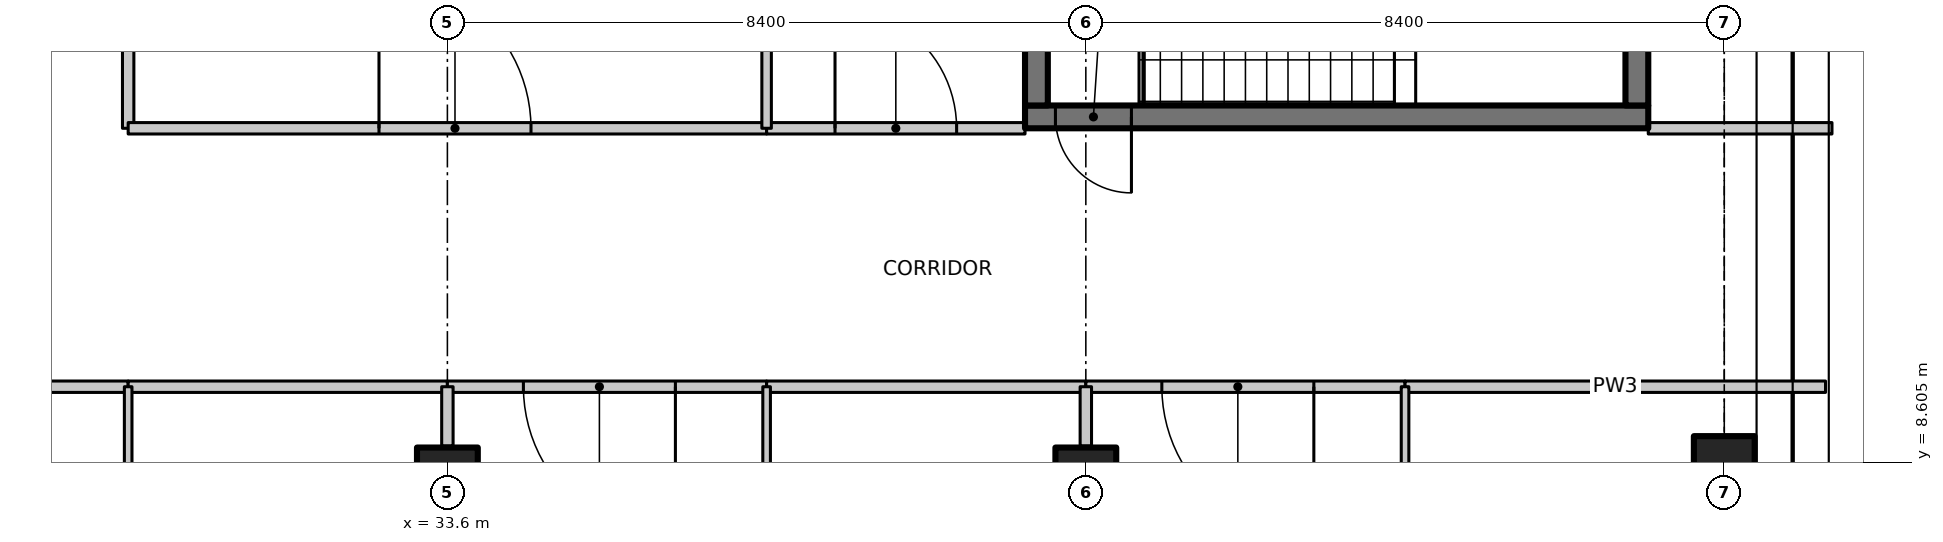
"""IFC4 building model, lengths in metres.
Left out: names, types, materials, properties, quantities, classifications, styles, units other than length and angle.
Written with IfcOpenShell. Run it as: python <this file> out.ifc"""

import sys

from ifc_helpers import new_model, si_unit, direction, frame, frame_2d, origin, origin_2d, place, context, subcontext, project, spatial, polyline, rectangle, outline, extrude, element, fill, save


model = new_model("IFC4")
c1 = context("Model", 3, precision=1e-05, world=origin(), true_north=direction((0.0, 1.0)))
c2 = subcontext(c1, "Body", "Model", "MODEL_VIEW")
j1 = project(units=[si_unit("LENGTHUNIT", "METRE"), si_unit("PLANEANGLEUNIT", "RADIAN")], contexts=[c1])
p1 = place(None, origin())
s1 = spatial("IfcSite", under=j1, at=p1, CompositionType="ELEMENT")
p2 = place(p1, origin())
s2 = spatial("IfcBuilding", under=s1, at=p2, CompositionType="ELEMENT")
p3 = place(p2, frame((0.0, 0.0, 251.7)))
s3 = spatial("IfcBuildingStorey", under=s2, at=p3, CompositionType="ELEMENT", Elevation=251.7)
for number, where, z_axis, x_axis in (
    (1, (33.6, 8.4, 0.0), (0.0, 0.0, 1.0), (1.0, 0.0, 0.0)),
    (2, (42.0, 8.4, 0.0), (0.0, 0.0, 1.0), (1.0, 0.0, 0.0)),
):
    element("IfcColumn", number, at=place(p3, frame(where, z_axis=z_axis, x_axis=x_axis)), inside=s3, PredefinedType="COLUMN", context=c2, shape_type="SweptSolid", body=[
        extrude(rectangle(XDim=0.8, YDim=0.8, at=origin_2d()), origin(), (0.0, 0.0, 1.0), 4.05),
    ])
p4 = place(p3, frame((50.4, 8.4, 0.0), z_axis=(0.0, 0.0, 1.0), x_axis=(1.0, 0.0, 0.0)))
e3 = element("IfcColumn", 3, at=p4, inside=s3, PredefinedType="COLUMN", context=c2, shape_type="SweptSolid", body=[
    extrude(rectangle(XDim=0.8, YDim=1.1, at=origin_2d()), origin(), (0.0, 0.0, 1.0), 4.05),
])
p5 = place(p3, frame((49.4, 13.15, 0.0), z_axis=(0.0, 0.0, 1.0), x_axis=(-1.0, 0.0, 0.0)))
e4 = element("IfcWall", 4, at=p5, inside=s3, PredefinedType="SHEAR", context=c2, shape_type="SweptSolid", body=[
    extrude(rectangle(XDim=8.2, YDim=0.3, at=frame_2d((4.1, 0.0))), origin(), (0.0, 0.0, 1.0), 4.05),
])
p6 = place(p5, frame((6.8, 0.0, 0.0)))
e5 = element("IfcOpeningElement", 5, at=p6, cuts=e4, PredefinedType="OPENING", context=c2, shape_type="SweptSolid", body=[
    extrude(rectangle(XDim=1.0, YDim=2.1, at=frame_2d((0.5, 1.05))), frame((0.0, 0.16, 0.0), z_axis=(0.0, -1.0, 0.0), x_axis=(1.0, 0.0, 0.0)), (0.0, 0.0, 1.0), 0.32),
])
for number, where, z_axis, x_axis in (
    (6, (41.35, 13.3, 0.0), (0.0, 0.0, 1.0), (0.0, 1.0, 0.0)),
    (7, (49.25, 13.3, 0.0), (0.0, 0.0, 1.0), (0.0, 1.0, 0.0)),
):
    element("IfcWall", number, at=place(p3, frame(where, z_axis=z_axis, x_axis=x_axis)), inside=s3, PredefinedType="SHEAR", context=c2, shape_type="SweptSolid", body=[
        extrude(rectangle(XDim=2.55, YDim=0.3, at=frame_2d((1.275, 0.0))), origin(), (0.0, 0.0, 1.0), 4.05),
    ])
p7 = place(p3, frame((29.4, 9.6, 0.0), z_axis=(0.0, 0.0, 1.0), x_axis=(-1.0, 0.0, 0.0)))
e8 = element("IfcWall", 8, at=p7, inside=s3, PredefinedType="PARTITIONING", context=c2, shape_type="SweptSolid", body=[
    extrude(rectangle(XDim=4.2, YDim=0.15, at=frame_2d((2.1, 0.0))), origin(), (0.0, 0.0, 1.0), 4.03),
])
p8 = place(p7, frame((1.2, 0.0, 0.0)))
e9 = element("IfcOpeningElement", 9, at=p8, cuts=e8, PredefinedType="OPENING", context=c2, shape_type="SweptSolid", body=[
    extrude(rectangle(XDim=1.6, YDim=2.1, at=frame_2d((0.8, 1.05))), frame((0.0, 0.085, 0.0), z_axis=(0.0, -1.0, 0.0), x_axis=(1.0, 0.0, 0.0)), (0.0, 0.0, 1.0), 0.17),
])
p9 = place(p3, frame((29.4, 21.2, 0.0), z_axis=(0.0, 0.0, 1.0), x_axis=(0.0, -1.0, 0.0)))
e10 = element("IfcWall", 10, at=p9, inside=s3, PredefinedType="PARTITIONING", context=c2, shape_type="SweptSolid", body=[
    extrude(rectangle(XDim=8.2, YDim=0.15, at=frame_2d((4.1, 0.0))), origin(), (0.0, 0.0, 1.0), 4.03),
])
p10 = place(p3, frame((33.6, 9.6, 0.0), z_axis=(0.0, 0.0, 1.0), x_axis=(-1.0, 0.0, 0.0)))
e11 = element("IfcWall", 11, at=p10, inside=s3, PredefinedType="PARTITIONING", context=c2, shape_type="SweptSolid", body=[
    extrude(rectangle(XDim=4.2, YDim=0.15, at=frame_2d((2.1, 0.0))), origin(), (0.0, 0.0, 1.0), 4.03),
])
p11 = place(p3, frame((37.8, 9.6, 0.0), z_axis=(0.0, 0.0, 1.0), x_axis=(-1.0, 0.0, 0.0)))
e12 = element("IfcWall", 12, at=p11, inside=s3, PredefinedType="PARTITIONING", context=c2, shape_type="SweptSolid", body=[
    extrude(rectangle(XDim=4.2, YDim=0.15, at=frame_2d((2.1, 0.0))), origin(), (0.0, 0.0, 1.0), 4.03),
])
p12 = place(p11, frame((1.2, 0.0, 0.0)))
e13 = element("IfcOpeningElement", 13, at=p12, cuts=e12, PredefinedType="OPENING", context=c2, shape_type="SweptSolid", body=[
    extrude(rectangle(XDim=2.0, YDim=2.4, at=frame_2d((1.0, 1.2))), frame((0.0, 0.085, 0.0), z_axis=(0.0, -1.0, 0.0), x_axis=(1.0, 0.0, 0.0)), (0.0, 0.0, 1.0), 0.17),
])
p13 = place(p3, frame((42.0, 9.6, 0.0), z_axis=(0.0, 0.0, 1.0), x_axis=(-1.0, 0.0, 0.0)))
e14 = element("IfcWall", 14, at=p13, inside=s3, PredefinedType="PARTITIONING", context=c2, shape_type="SweptSolid", body=[
    extrude(rectangle(XDim=4.2, YDim=0.15, at=frame_2d((2.1, 0.0))), origin(), (0.0, 0.0, 1.0), 4.03),
])
p14 = place(p3, frame((46.2, 9.6, 0.0), z_axis=(0.0, 0.0, 1.0), x_axis=(-1.0, 0.0, 0.0)))
e15 = element("IfcWall", 15, at=p14, inside=s3, PredefinedType="PARTITIONING", context=c2, shape_type="SweptSolid", body=[
    extrude(rectangle(XDim=4.2, YDim=0.15, at=frame_2d((2.1, 0.0))), origin(), (0.0, 0.0, 1.0), 4.03),
])
p15 = place(p14, frame((1.2, 0.0, 0.0)))
e16 = element("IfcOpeningElement", 16, at=p15, cuts=e15, PredefinedType="OPENING", context=c2, shape_type="SweptSolid", body=[
    extrude(rectangle(XDim=2.0, YDim=2.4, at=frame_2d((1.0, 1.2))), frame((0.0, 0.085, 0.0), z_axis=(0.0, -1.0, 0.0), x_axis=(1.0, 0.0, 0.0)), (0.0, 0.0, 1.0), 0.17),
])
p16 = place(p3, frame((51.732, 9.6, 0.0), z_axis=(0.0, 0.0, 1.0), x_axis=(-1.0, 0.0, 0.0)))
e17 = element("IfcWall", 17, at=p16, inside=s3, PredefinedType="PARTITIONING", context=c2, shape_type="SweptSolid", body=[
    extrude(outline(polyline([(0.0, 0.0), (5.532, 0.0), (5.532, 4.03), (1.782, 4.03), (1.78, 3.68), (0.884, 3.68), (0.882, 4.03), (0.252, 4.03), (0.0, 4.03), (0.0, 0.0)])), frame((0.0, 0.075, 0.0), z_axis=(0.0, -1.0, 0.0), x_axis=(1.0, 0.0, 0.0)), (0.0, 0.0, 1.0), 0.15),
])
p17 = place(p3, frame((29.4, 13.0, 0.0), z_axis=(0.0, 0.0, 1.0), x_axis=(1.0, 0.0, 0.0)))
e18 = element("IfcWall", 18, at=p17, inside=s3, PredefinedType="PARTITIONING", context=c2, shape_type="SweptSolid", body=[
    extrude(rectangle(XDim=8.4, YDim=0.15, at=frame_2d((4.2, 0.0))), origin(), (0.0, 0.0, 1.0), 4.03),
])
p18 = place(p17, frame((3.3, 0.0, 0.0)))
e19 = element("IfcOpeningElement", 19, at=p18, cuts=e18, PredefinedType="OPENING", context=c2, shape_type="SweptSolid", body=[
    extrude(rectangle(XDim=2.0, YDim=2.4, at=frame_2d((1.0, 1.2))), frame((0.0, 0.085, 0.0), z_axis=(0.0, -1.0, 0.0), x_axis=(1.0, 0.0, 0.0)), (0.0, 0.0, 1.0), 0.17),
])
p19 = place(p3, frame((37.8, 13.0, 0.0), z_axis=(0.0, 0.0, 1.0), x_axis=(1.0, 0.0, 0.0)))
e20 = element("IfcWall", 20, at=p19, inside=s3, PredefinedType="PARTITIONING", context=c2, shape_type="SweptSolid", body=[
    extrude(rectangle(XDim=3.4, YDim=0.15, at=frame_2d((1.7, 0.0))), origin(), (0.0, 0.0, 1.0), 4.03),
])
p20 = place(p19, frame((0.9, 0.0, 0.0)))
e21 = element("IfcOpeningElement", 21, at=p20, cuts=e20, PredefinedType="OPENING", context=c2, shape_type="SweptSolid", body=[
    extrude(rectangle(XDim=1.6, YDim=2.1, at=frame_2d((0.8, 1.05))), frame((0.0, 0.085, 0.0), z_axis=(0.0, -1.0, 0.0), x_axis=(1.0, 0.0, 0.0)), (0.0, 0.0, 1.0), 0.17),
])
p21 = place(p3, frame((49.4, 13.0, 0.0), z_axis=(0.0, 0.0, 1.0), x_axis=(1.0, 0.0, 0.0)))
e22 = element("IfcWall", 22, at=p21, inside=s3, PredefinedType="PARTITIONING", context=c2, shape_type="SweptSolid", body=[
    extrude(rectangle(XDim=2.417, YDim=0.15, at=frame_2d((1.208, 0.0))), origin(), (0.0, 0.0, 1.0), 3.68),
])
p22 = place(p3, frame((29.4, 9.6, 0.0), z_axis=(0.0, 0.0, 1.0), x_axis=(0.0, -1.0, 0.0)))
e23 = element("IfcWall", 23, at=p22, inside=s3, PredefinedType="PARTITIONING", context=c2, shape_type="SweptSolid", body=[
    extrude(rectangle(XDim=4.8, YDim=0.1, at=frame_2d((2.4, 0.0))), origin(), (0.0, 0.0, 1.0), 4.03),
])
p23 = place(p22, frame((1.8, 0.0, 0.0)))
e24 = element("IfcOpeningElement", 24, at=p23, cuts=e23, PredefinedType="OPENING", context=c2, shape_type="SweptSolid", body=[
    extrude(rectangle(XDim=1.0, YDim=2.1, at=frame_2d((0.5, 1.05))), frame((0.0, 0.06, 0.0), z_axis=(0.0, -1.0, 0.0), x_axis=(1.0, 0.0, 0.0)), (0.0, 0.0, 1.0), 0.12),
])
p24 = place(p3, frame((33.6, 9.6, 0.0), z_axis=(0.0, 0.0, 1.0), x_axis=(0.0, -1.0, 0.0)))
e25 = element("IfcWall", 25, at=p24, inside=s3, PredefinedType="PARTITIONING", context=c2, shape_type="SweptSolid", body=[
    extrude(rectangle(XDim=0.78, YDim=0.15, at=frame_2d((0.39, 0.0))), origin(), (0.0, 0.0, 1.0), 4.03),
])
p25 = place(p3, frame((37.8, 9.6, 0.0), z_axis=(0.0, 0.0, 1.0), x_axis=(0.0, -1.0, 0.0)))
e26 = element("IfcWall", 26, at=p25, inside=s3, PredefinedType="PARTITIONING", context=c2, shape_type="SweptSolid", body=[
    extrude(rectangle(XDim=3.6, YDim=0.1, at=frame_2d((1.8, 0.0))), origin(), (0.0, 0.0, 1.0), 4.03),
])
p26 = place(p3, frame((42.0, 9.6, 0.0), z_axis=(0.0, 0.0, 1.0), x_axis=(0.0, -1.0, 0.0)))
e27 = element("IfcWall", 27, at=p26, inside=s3, PredefinedType="PARTITIONING", context=c2, shape_type="SweptSolid", body=[
    extrude(rectangle(XDim=0.78, YDim=0.15, at=frame_2d((0.39, 0.0))), origin(), (0.0, 0.0, 1.0), 4.03),
])
p27 = place(p3, frame((46.2, 9.6, 0.0), z_axis=(0.0, 0.0, 1.0), x_axis=(0.0, -1.0, 0.0)))
e28 = element("IfcWall", 28, at=p27, inside=s3, PredefinedType="PARTITIONING", context=c2, shape_type="SweptSolid", body=[
    extrude(outline(polyline([(0.0, 0.0), (6.0, 0.0), (6.0, 3.68), (4.736, 3.68), (4.734, 4.03), (0.0, 4.03), (0.0, 0.0)])), frame((0.0, 0.05, 0.0), z_axis=(0.0, -1.0, 0.0), x_axis=(1.0, 0.0, 0.0)), (0.0, 0.0, 1.0), 0.1),
])
p28 = place(p27, frame((2.4, 0.0, 0.0)))
e29 = element("IfcOpeningElement", 29, at=p28, cuts=e28, PredefinedType="OPENING", context=c2, shape_type="SweptSolid", body=[
    extrude(rectangle(XDim=1.0, YDim=2.1, at=frame_2d((0.5, 1.05))), frame((0.0, 0.06, 0.0), z_axis=(0.0, -1.0, 0.0), x_axis=(1.0, 0.0, 0.0)), (0.0, 0.0, 1.0), 0.12),
])
p29 = place(p3, frame((37.8, 30.243, 0.0), z_axis=(0.0, 0.0, 1.0), x_axis=(0.0, -1.0, 0.0)))
e30 = element("IfcWall", 30, at=p29, inside=s3, PredefinedType="PARTITIONING", context=c2, shape_type="SweptSolid", body=[
    extrude(outline(polyline([(0.0, 0.0), (17.243, 0.0), (17.243, 4.03), (5.493, 4.03), (5.491, 3.68), (4.595, 3.68), (4.593, 4.03), (0.0, 4.03), (0.0, 0.0)])), frame((0.0, 0.062, 0.0), z_axis=(0.0, -1.0, 0.0), x_axis=(1.0, 0.0, 0.0)), (0.0, 0.0, 1.0), 0.125),
])
p30 = place(p6, origin())
e31 = element("IfcDoor", 31, at=p30, inside=s3, OperationType="SINGLE_SWING_LEFT", PredefinedType="DOOR", context=c2, shape_type="SweptSolid", body=[
    extrude(rectangle(XDim=1.0, YDim=2.1, at=frame_2d((0.5, 1.05))), frame((0.0, 0.025, 0.0), z_axis=(0.0, -1.0, 0.0), x_axis=(1.0, 0.0, 0.0)), (0.0, 0.0, 1.0), 0.05),
])
fill(e5, e31)
p31 = place(p12, origin())
e32 = element("IfcDoor", 32, at=p31, inside=s3, OperationType="DOUBLE_DOOR_SINGLE_SWING", PredefinedType="DOOR", context=c2, shape_type="SweptSolid", body=[
    extrude(rectangle(XDim=2.0, YDim=2.4, at=frame_2d((1.0, 1.2))), frame((0.0, 0.025, 0.0), z_axis=(0.0, -1.0, 0.0), x_axis=(1.0, 0.0, 0.0)), (0.0, 0.0, 1.0), 0.05),
])
fill(e13, e32)
p32 = place(p15, origin())
e33 = element("IfcDoor", 33, at=p32, inside=s3, OperationType="DOUBLE_DOOR_SINGLE_SWING", PredefinedType="DOOR", context=c2, shape_type="SweptSolid", body=[
    extrude(rectangle(XDim=2.0, YDim=2.4, at=frame_2d((1.0, 1.2))), frame((0.0, 0.025, 0.0), z_axis=(0.0, -1.0, 0.0), x_axis=(1.0, 0.0, 0.0)), (0.0, 0.0, 1.0), 0.05),
])
fill(e16, e33)
p33 = place(p18, origin())
e34 = element("IfcDoor", 34, at=p33, inside=s3, OperationType="DOUBLE_DOOR_SINGLE_SWING", PredefinedType="DOOR", context=c2, shape_type="SweptSolid", body=[
    extrude(rectangle(XDim=2.0, YDim=2.4, at=frame_2d((1.0, 1.2))), frame((0.0, 0.025, 0.0), z_axis=(0.0, -1.0, 0.0), x_axis=(1.0, 0.0, 0.0)), (0.0, 0.0, 1.0), 0.05),
])
fill(e19, e34)
p34 = place(p20, origin())
e35 = element("IfcDoor", 35, at=p34, inside=s3, OperationType="DOUBLE_DOOR_SINGLE_SWING", PredefinedType="DOOR", context=c2, shape_type="SweptSolid", body=[
    extrude(rectangle(XDim=1.6, YDim=2.1, at=frame_2d((0.8, 1.05))), frame((0.0, 0.025, 0.0), z_axis=(0.0, -1.0, 0.0), x_axis=(1.0, 0.0, 0.0)), (0.0, 0.0, 1.0), 0.05),
])
fill(e21, e35)
save(model, sys.argv[1])
